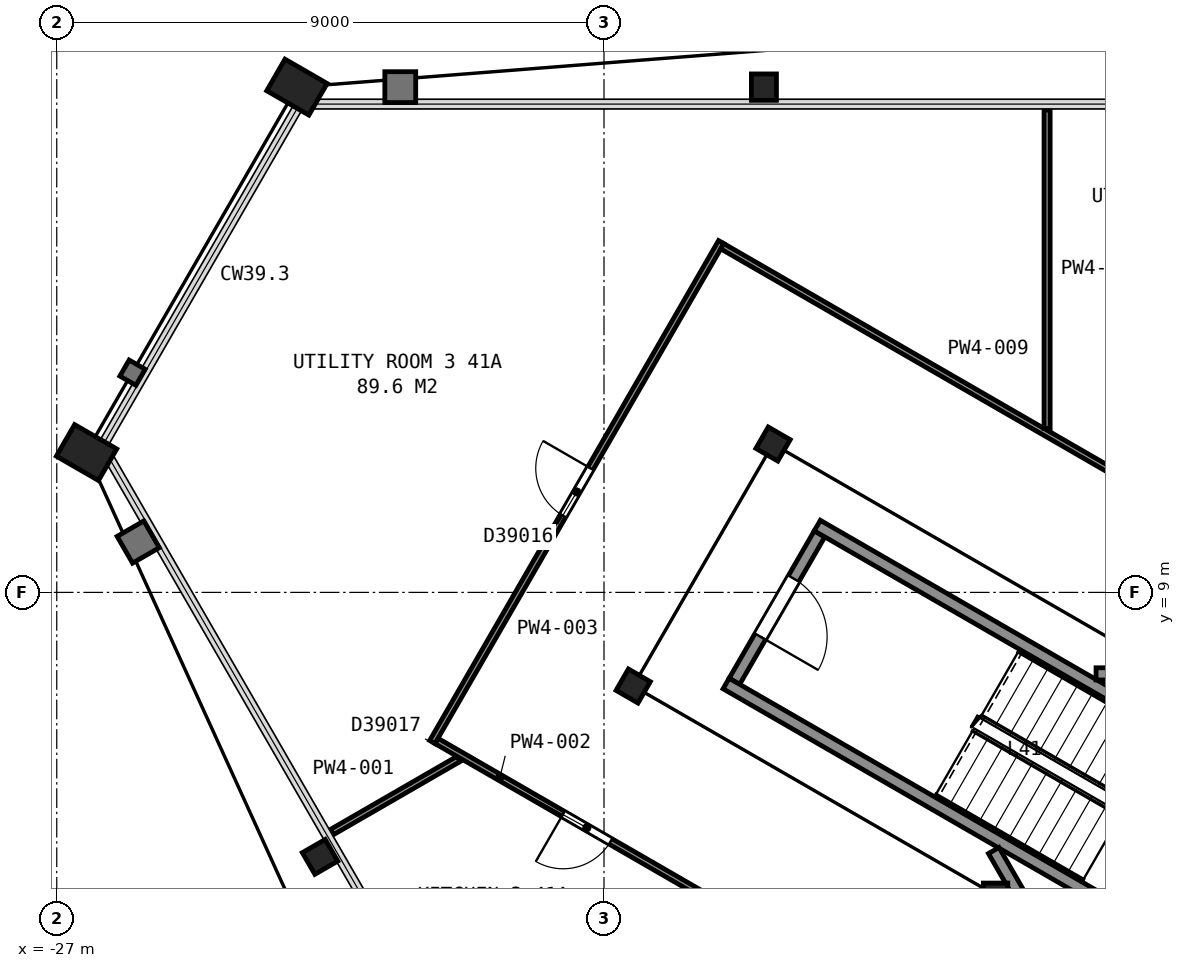
"""IFC4 building model, lengths in metres.
Left out: names, types, materials, properties, quantities, classifications, styles, units other than length and angle.
Written with IfcOpenShell. Run it as: python <this file> out.ifc"""

import sys

from ifc_helpers import new_model, si_unit, direction, frame, frame_2d, origin, origin_2d, place, context, subcontext, project, spatial, rectangle, hollow_rectangle, i_section, extrude, element, fill, save


model = new_model("IFC4")
c1 = context("Model", 3, precision=1e-05, world=origin(), true_north=direction((0.0, 1.0)))
c2 = subcontext(c1, "Body", "Model", "MODEL_VIEW")
j1 = project(units=[si_unit("LENGTHUNIT", "METRE"), si_unit("PLANEANGLEUNIT", "RADIAN")], contexts=[c1])
p1 = place(None, origin())
s1 = spatial("IfcSite", under=j1, at=p1, CompositionType="ELEMENT")
p2 = place(p1, origin())
s2 = spatial("IfcBuilding", under=s1, at=p2, CompositionType="ELEMENT")
p3 = place(p2, frame((0.0, 0.0, 167.3)))
s3 = spatial("IfcBuildingStorey", under=s2, at=p3, CompositionType="ELEMENT", Elevation=167.3)
p4 = place(p3, frame((-15.37, 17.31, 0.0), z_axis=(0.0, 0.0, 1.0), x_axis=(1.0, 0.0, 0.0)))
e1 = element("IfcColumn", 1, at=p4, inside=s3, PredefinedType="COLUMN", context=c2, shape_type="SweptSolid", body=[
    extrude(i_section(OverallWidth=0.411, OverallDepth=0.434, WebThickness=0.036, FlangeThickness=0.057, FilletRadius=0.015, at=origin_2d()), origin(), (0.0, 0.0, 1.0), 3.7),
])
for number, where, z_axis, x_axis in (
    (2, (-23.05, 17.31, 0.0), (0.0, 0.0, 1.0), (0.5, 0.866, 0.0)),
    (3, (-26.51, 11.3, 0.0), (0.0, 0.0, 1.0), (0.5, 0.866, 0.0)),
):
    element("IfcColumn", number, at=place(p3, frame(where, z_axis=z_axis, x_axis=x_axis)), inside=s3, PredefinedType="COLUMN", context=c2, shape_type="SweptSolid", body=[
        extrude(hollow_rectangle(XDim=0.6, YDim=0.8, WallThickness=0.05, at=origin_2d()), origin(), (0.0, 0.0, 1.0), 3.7),
    ])
p5 = place(p3, frame((-22.67, 4.65, 0.0), z_axis=(0.0, 0.0, 1.0), x_axis=(-0.5, 0.866025403784, 0.0)))
e4 = element("IfcColumn", 4, at=p5, inside=s3, PredefinedType="COLUMN", context=c2, shape_type="SweptSolid", body=[
    extrude(i_section(OverallWidth=0.411, OverallDepth=0.434, WebThickness=0.036, FlangeThickness=0.057, FilletRadius=0.015, at=origin_2d()), origin(), (0.0, 0.0, 1.0), 3.7),
])
for number, where, z_axis, x_axis in (
    (5, (-15.22, 11.44, 0.0), (0.0, 0.0, 1.0), (0.5, 0.866, 0.0)),
    (6, (-17.52, 7.46, 0.0), (0.0, 0.0, 1.0), (0.5, 0.866, 0.0)),
):
    element("IfcColumn", number, at=place(p3, frame(where, z_axis=z_axis, x_axis=x_axis)), inside=s3, PredefinedType="COLUMN", context=c2, shape_type="SweptSolid", body=[
        extrude(i_section(OverallWidth=0.406, OverallDepth=0.417, WebThickness=0.03, FlangeThickness=0.048, FilletRadius=0.015, at=origin_2d()), origin(), (0.0, 0.0, 1.0), 3.7),
    ])
p6 = place(p3, frame((-11.56, 4.02, 0.0), z_axis=(0.0, 0.0, 1.0), x_axis=(1.0, 0.0, 0.0)))
e7 = element("IfcColumn", 7, at=p6, inside=s3, PredefinedType="COLUMN", context=c2, shape_type="SweptSolid", body=[
    extrude(i_section(OverallWidth=0.401, OverallDepth=0.399, WebThickness=0.025, FlangeThickness=0.04, FilletRadius=0.015, at=origin_2d()), origin(), (0.0, 0.0, 1.0), 3.7),
])
p7 = place(p3, frame((-14.455, 9.962, 0.0), z_axis=(0.0, 0.0, 1.0), x_axis=(-0.500049511043, -0.865996816683, 0.0)))
e8 = element("IfcWall", 8, at=p7, inside=s3, PredefinedType="PARTITIONING", context=c2, shape_type="SweptSolid", body=[
    extrude(rectangle(XDim=2.8, YDim=0.2, at=frame_2d((1.4, 0.0))), origin(), (0.0, 0.0, 1.0), 3.45),
])
p8 = place(p7, frame((0.85, 0.0, 0.0)))
e9 = element("IfcOpeningElement", 9, at=p8, cuts=e8, PredefinedType="OPENING", context=c2, shape_type="SweptSolid", body=[
    extrude(rectangle(XDim=1.1, YDim=2.1, at=frame_2d((0.55, 1.05))), frame((0.0, 0.11, 0.0), z_axis=(0.0, -1.0, 0.0), x_axis=(1.0, 0.0, 0.0)), (0.0, 0.0, 1.0), 0.22),
])
for number, where, z_axis, x_axis in (
    (10, (-7.678, 2.701, 0.0), (0.0, 0.0, 1.0), (-0.866, 0.5, 0.0)),
    (11, (-6.178, 5.299, 0.0), (0.0, 0.0, 1.0), (-0.866, 0.5, 0.0)),
):
    element("IfcWall", number, at=place(p3, frame(where, z_axis=z_axis, x_axis=x_axis)), inside=s3, PredefinedType="PARTITIONING", context=c2, shape_type="SweptSolid", body=[
        extrude(rectangle(XDim=9.6, YDim=0.2, at=frame_2d((4.8, 0.0))), origin(), (0.0, 0.0, 1.0), 3.45),
    ])
p9 = place(p3, frame((-11.591, 4.755, 0.0), z_axis=(0.0, 0.0, 1.0), x_axis=(0.500043977787, -0.866000011708, 0.0)))
e12 = element("IfcWall", 12, at=p9, inside=s3, PredefinedType="PARTITIONING", context=c2, shape_type="SweptSolid", body=[
    extrude(rectangle(XDim=6.617, YDim=0.2, at=frame_2d((3.308, 0.0))), origin(), (0.0, 0.0, 1.0), 3.45),
])
p10 = place(p9, frame((3.695, 0.0, 0.0)))
e13 = element("IfcOpeningElement", 13, at=p10, cuts=e12, PredefinedType="OPENING", context=c2, shape_type="SweptSolid", body=[
    extrude(rectangle(XDim=1.8, YDim=2.1, at=frame_2d((0.9, 1.05))), frame((0.0, 0.11, 0.0), z_axis=(0.0, -1.0, 0.0), x_axis=(1.0, 0.0, 0.0)), (0.0, 0.0, 1.0), 0.22),
])
p11 = place(p3, frame((-9.908, 7.66, 0.0), z_axis=(0.0, 0.0, 1.0), x_axis=(1.0, 0.0, 0.0)))
e14 = element("IfcWall", 14, at=p11, inside=s3, PredefinedType="PARTITIONING", context=c2, shape_type="SweptSolid", body=[
    extrude(rectangle(XDim=3.621, YDim=0.2, at=frame_2d((1.811, 0.0))), origin(), (0.0, 0.0, 1.0), 3.45),
])
p12 = place(p3, frame((-22.475, 5.058, 0.0), z_axis=(0.0, 0.0, 1.0), x_axis=(0.865953976614, 0.500123695086, 0.0)))
e15 = element("IfcWall", 15, at=p12, inside=s3, PredefinedType="PARTITIONING", context=c2, shape_type="SweptSolid", body=[
    extrude(rectangle(XDim=2.405, YDim=0.1, at=frame_2d((1.203, 0.0))), origin(), (0.0, 0.0, 1.0), 2.713),
])
p13 = place(p3, frame((-16.229, 3.944, 0.0), z_axis=(0.0, 0.0, 1.0), x_axis=(-0.866079026679, 0.499907110918, 0.0)))
e16 = element("IfcWall", 16, at=p13, inside=s3, PredefinedType="PARTITIONING", context=c2, shape_type="SweptSolid", body=[
    extrude(rectangle(XDim=5.227, YDim=0.1, at=frame_2d((2.613, 0.0))), origin(), (0.0, 0.0, 1.0), 2.713),
])
p14 = place(p13, frame((1.921, 0.0, 0.0)))
e17 = element("IfcOpeningElement", 17, at=p14, cuts=e16, PredefinedType="OPENING", context=c2, shape_type="SweptSolid", body=[
    extrude(rectangle(XDim=0.9, YDim=2.1, at=frame_2d((0.45, 1.05))), frame((0.0, 0.06, 0.0), z_axis=(0.0, -1.0, 0.0), x_axis=(1.0, 0.0, 0.0)), (0.0, 0.0, 1.0), 0.12),
])
p15 = place(p3, frame((-20.824, 6.539, 0.0), z_axis=(0.0, 0.0, 1.0), x_axis=(0.500297300687, 0.865853689098, 0.0)))
e18 = element("IfcWall", 18, at=p15, inside=s3, PredefinedType="PARTITIONING", context=c2, shape_type="SweptSolid", body=[
    extrude(rectangle(XDim=9.496, YDim=0.1, at=frame_2d((4.748, 0.0))), origin(), (0.0, 0.0, 1.0), 2.713),
])
p16 = place(p15, frame((4.3, 0.0, 0.0)))
e19 = element("IfcOpeningElement", 19, at=p16, cuts=e18, PredefinedType="OPENING", context=c2, shape_type="SweptSolid", body=[
    extrude(rectangle(XDim=0.9, YDim=2.1, at=frame_2d((0.45, 1.05))), frame((0.0, 0.06, 0.0), z_axis=(0.0, -1.0, 0.0), x_axis=(1.0, 0.0, 0.0)), (0.0, 0.0, 1.0), 0.12),
])
p17 = place(p3, frame((-16.055, 14.693, 0.0), z_axis=(0.0, 0.0, 1.0), x_axis=(0.866070360466, -0.499922124658, 0.0)))
e20 = element("IfcWall", 20, at=p17, inside=s3, PredefinedType="PARTITIONING", context=c2, shape_type="SweptSolid", body=[
    extrude(rectangle(XDim=8.503, YDim=0.1, at=frame_2d((4.251, 0.0))), origin(), (0.0, 0.0, 1.0), 2.713),
])
p18 = place(p3, frame((-10.713, 11.697, 0.0), z_axis=(0.0, 0.0, 1.0), x_axis=(0.0, 1.0, 0.0)))
e21 = element("IfcWall", 21, at=p18, inside=s3, PredefinedType="PARTITIONING", context=c2, shape_type="SweptSolid", body=[
    extrude(rectangle(XDim=5.239, YDim=0.1, at=frame_2d((2.619, 0.0))), origin(), (0.0, 0.0, 1.0), 2.713),
])
p19 = place(p8, origin())
e22 = element("IfcDoor", 22, at=p19, inside=s3, OperationType="SINGLE_SWING_RIGHT", PredefinedType="DOOR", context=c2, shape_type="SweptSolid", body=[
    extrude(rectangle(XDim=1.1, YDim=2.1, at=frame_2d((0.55, 1.05))), frame((0.0, 0.025, 0.0), z_axis=(0.0, -1.0, 0.0), x_axis=(1.0, 0.0, 0.0)), (0.0, 0.0, 1.0), 0.05),
])
fill(e9, e22)
p20 = place(p14, origin())
e23 = element("IfcDoor", 23, at=p20, inside=s3, OperationType="SINGLE_SWING_RIGHT", PredefinedType="DOOR", context=c2, shape_type="SweptSolid", body=[
    extrude(rectangle(XDim=0.9, YDim=2.1, at=frame_2d((0.45, 1.05))), frame((0.0, 0.025, 0.0), z_axis=(0.0, -1.0, 0.0), x_axis=(1.0, 0.0, 0.0)), (0.0, 0.0, 1.0), 0.05),
])
fill(e17, e23)
p21 = place(p16, origin())
e24 = element("IfcDoor", 24, at=p21, inside=s3, OperationType="SINGLE_SWING_RIGHT", PredefinedType="DOOR", context=c2, shape_type="SweptSolid", body=[
    extrude(rectangle(XDim=0.9, YDim=2.1, at=frame_2d((0.45, 1.05))), frame((0.0, 0.025, 0.0), z_axis=(0.0, -1.0, 0.0), x_axis=(1.0, 0.0, 0.0)), (0.0, 0.0, 1.0), 0.05),
])
fill(e19, e24)
save(model, sys.argv[1])
